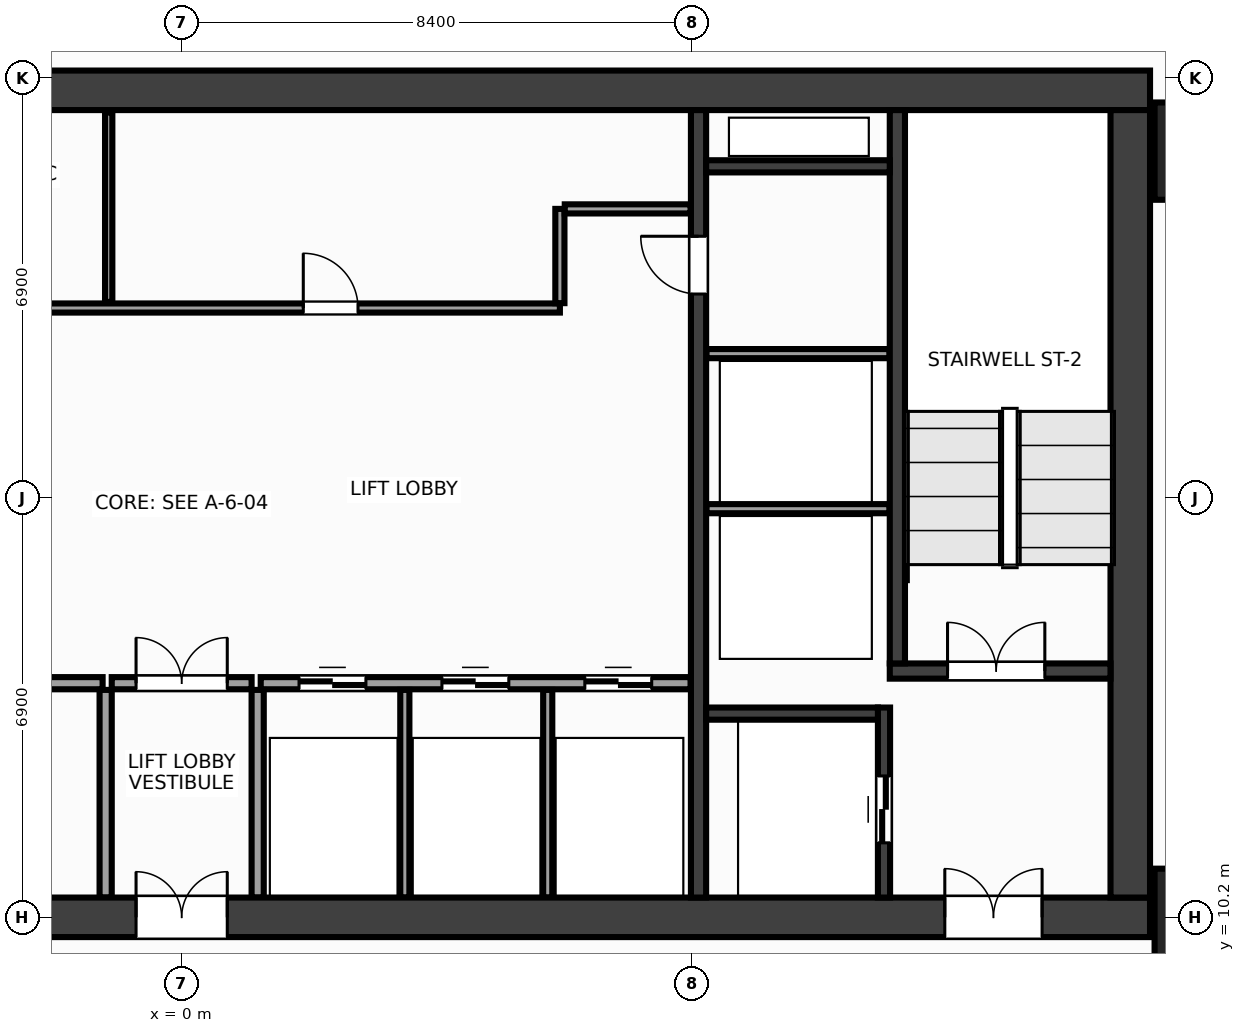
"""IFC4 building model, lengths in metres.
Left out: names, types, materials, properties, quantities, classifications, styles, units other than length and angle.
Written with IfcOpenShell. Run it as: python <this file> out.ifc"""

import sys

from ifc_helpers import new_model, si_unit, direction, frame, frame_2d, origin, origin_2d, place, context, subcontext, project, spatial, rectangle, extrude, source, transform, mapped, element, fill, save


model = new_model("IFC4")
c1 = context("Model", 3, precision=1e-05, world=origin(), true_north=direction((0.0, 1.0)))
c2 = subcontext(c1, "Body", "Model", "MODEL_VIEW")
j1 = project(units=[si_unit("LENGTHUNIT", "METRE"), si_unit("PLANEANGLEUNIT", "RADIAN")], contexts=[c1])
p1 = place(None, origin())
s1 = spatial("IfcSite", under=j1, at=p1, CompositionType="ELEMENT")
p2 = place(p1, origin())
s2 = spatial("IfcBuilding", under=s1, at=p2, CompositionType="ELEMENT")
p3 = place(p2, frame((0.0, 0.0, 110.0)))
s3 = spatial("IfcBuildingStorey", under=s2, at=p3, CompositionType="ELEMENT", Elevation=110.0)
m1 = source(origin(), c2, "Body", "SweptSolid", [
    extrude(rectangle(XDim=31.85, YDim=0.65, at=frame_2d((15.925, 0.0))), origin(), (0.0, 0.0, 1.0), 3.6),
])
p4 = place(p3, frame((-15.925, 23.8, 0.0), z_axis=(0.0, 0.0, 1.0), x_axis=(1.0, 0.0, 0.0)))
e1 = element("IfcWall", 1, at=p4, inside=s3, PredefinedType="SHEAR", context=c2, shape_type="MappedRepresentation", body=[
    mapped(m1, transform((0.0, 0.0, 0.0), x_axis=(1.0, 0.0, 0.0), y_axis=(0.0, 1.0, 0.0), z_axis=(0.0, 0.0, 1.0), scale=1.0)),
])
p5 = place(p3, frame((-15.925, 10.2, 0.0), z_axis=(0.0, 0.0, 1.0), x_axis=(1.0, 0.0, 0.0)))
e2 = element("IfcWall", 2, at=p5, inside=s3, PredefinedType="SHEAR", context=c2, shape_type="MappedRepresentation", body=[
    mapped(m1, transform((0.0, 0.0, 0.0), x_axis=(1.0, 0.0, 0.0), y_axis=(0.0, 1.0, 0.0), z_axis=(0.0, 0.0, 1.0), scale=1.0)),
])
p6 = place(p5, frame((1.775, 0.0, 0.0)))
e3 = element("IfcOpeningElement", 3, at=p6, cuts=e2, PredefinedType="OPENING", context=c2, shape_type="SweptSolid", body=[
    extrude(rectangle(XDim=1.6, YDim=2.15, at=frame_2d((0.8, 1.075))), frame((0.0, 0.337, 0.0), z_axis=(0.0, -1.0, 0.0), x_axis=(1.0, 0.0, 0.0)), (0.0, 0.0, 1.0), 0.674),
])
p7 = place(p5, frame((28.475, 0.0, 0.0)))
e4 = element("IfcOpeningElement", 4, at=p7, cuts=e2, PredefinedType="OPENING", context=c2, shape_type="SweptSolid", body=[
    extrude(rectangle(XDim=1.6, YDim=2.15, at=frame_2d((0.8, 1.075))), frame((0.0, 0.337, 0.0), z_axis=(0.0, -1.0, 0.0), x_axis=(1.0, 0.0, 0.0)), (0.0, 0.0, 1.0), 0.674),
])
p8 = place(p5, frame((15.175, 0.0, 0.0)))
e5 = element("IfcOpeningElement", 5, at=p8, cuts=e2, PredefinedType="OPENING", context=c2, shape_type="SweptSolid", body=[
    extrude(rectangle(XDim=1.5, YDim=2.2, at=frame_2d((0.75, 1.1))), frame((0.0, 0.337, 0.0), z_axis=(0.0, -1.0, 0.0), x_axis=(1.0, 0.0, 0.0)), (0.0, 0.0, 1.0), 0.674),
])
m2 = source(origin(), c2, "Body", "SweptSolid", [
    extrude(rectangle(XDim=12.95, YDim=0.65, at=frame_2d((6.475, 0.0))), origin(), (0.0, 0.0, 1.0), 3.6),
])
p9 = place(p3, frame((15.6, 10.525, 0.0), z_axis=(0.0, 0.0, 1.0), x_axis=(0.0, 1.0, 0.0)))
e6 = element("IfcWall", 6, at=p9, inside=s3, PredefinedType="SHEAR", context=c2, shape_type="MappedRepresentation", body=[
    mapped(m2, transform((0.0, 0.0, 0.0), x_axis=(1.0, 0.0, 0.0), y_axis=(0.0, 1.0, 0.0), z_axis=(0.0, 0.0, 1.0), scale=1.0)),
])
m3 = source(origin(), c2, "Body", "SweptSolid", [
    extrude(rectangle(XDim=12.95, YDim=0.25, at=frame_2d((6.475, 0.0))), origin(), (0.0, 0.0, 1.0), 3.6),
])
p10 = place(p3, frame((8.5, 10.525, 0.0), z_axis=(0.0, 0.0, 1.0), x_axis=(0.0, 1.0, 0.0)))
e7 = element("IfcWall", 7, at=p10, inside=s3, PredefinedType="SHEAR", context=c2, shape_type="MappedRepresentation", body=[
    mapped(m3, transform((0.0, 0.0, 0.0), x_axis=(1.0, 0.0, 0.0), y_axis=(0.0, 1.0, 0.0), z_axis=(0.0, 0.0, 1.0), scale=1.0)),
])
p11 = place(p10, frame((9.925, 0.0, 0.0)))
e8 = element("IfcOpeningElement", 8, at=p11, cuts=e7, PredefinedType="OPENING", context=c2, shape_type="SweptSolid", body=[
    extrude(rectangle(XDim=0.95, YDim=2.15, at=frame_2d((0.475, 1.075))), frame((0.0, 0.137, 0.0), z_axis=(0.0, -1.0, 0.0), x_axis=(1.0, 0.0, 0.0)), (0.0, 0.0, 1.0), 0.274),
])
m4 = source(origin(), c2, "Body", "SweptSolid", [
    extrude(rectangle(XDim=3.63, YDim=0.25, at=frame_2d((1.815, 0.0))), origin(), (0.0, 0.0, 1.0), 3.6),
])
p12 = place(p3, frame((11.645, 14.25, 0.0), z_axis=(0.0, 0.0, 1.0), x_axis=(1.0, 0.0, 0.0)))
e9 = element("IfcWall", 9, at=p12, inside=s3, PredefinedType="SHEAR", context=c2, shape_type="MappedRepresentation", body=[
    mapped(m4, transform((0.0, 0.0, 0.0), x_axis=(1.0, 0.0, 0.0), y_axis=(0.0, 1.0, 0.0), z_axis=(0.0, 0.0, 1.0), scale=1.0)),
])
p13 = place(p12, frame((0.95, 0.0, 0.0)))
e10 = element("IfcOpeningElement", 10, at=p13, cuts=e9, PredefinedType="OPENING", context=c2, shape_type="SweptSolid", body=[
    extrude(rectangle(XDim=1.6, YDim=2.15, at=frame_2d((0.8, 1.075))), frame((0.0, 0.137, 0.0), z_axis=(0.0, -1.0, 0.0), x_axis=(1.0, 0.0, 0.0)), (0.0, 0.0, 1.0), 0.274),
])
m5 = source(origin(), c2, "Body", "SweptSolid", [
    extrude(rectangle(XDim=9.1, YDim=0.25, at=frame_2d((4.55, 0.0))), origin(), (0.0, 0.0, 1.0), 3.6),
])
p14 = place(p3, frame((11.77, 14.375, 0.0), z_axis=(0.0, 0.0, 1.0), x_axis=(0.0, 1.0, 0.0)))
e11 = element("IfcWall", 11, at=p14, inside=s3, PredefinedType="SHEAR", context=c2, shape_type="MappedRepresentation", body=[
    mapped(m5, transform((0.0, 0.0, 0.0), x_axis=(1.0, 0.0, 0.0), y_axis=(0.0, 1.0, 0.0), z_axis=(0.0, 0.0, 1.0), scale=1.0)),
])
m6 = source(origin(), c2, "Body", "SweptSolid", [
    extrude(rectangle(XDim=3.125, YDim=0.2, at=frame_2d((1.562, 0.0))), origin(), (0.0, 0.0, 1.0), 3.6),
])
p15 = place(p3, frame((11.55, 10.525, 0.0), z_axis=(0.0, 0.0, 1.0), x_axis=(0.0, 1.0, 0.0)))
e12 = element("IfcWall", 12, at=p15, inside=s3, PredefinedType="SHEAR", context=c2, shape_type="MappedRepresentation", body=[
    mapped(m6, transform((0.0, 0.0, 0.0), x_axis=(1.0, 0.0, 0.0), y_axis=(0.0, 1.0, 0.0), z_axis=(0.0, 0.0, 1.0), scale=1.0)),
])
p16 = place(p15, frame((0.9, 0.0, 0.0)))
e13 = element("IfcOpeningElement", 13, at=p16, cuts=e12, PredefinedType="OPENING", context=c2, shape_type="SweptSolid", body=[
    extrude(rectangle(XDim=1.1, YDim=2.15, at=frame_2d((0.55, 1.075))), frame((0.0, 0.112, 0.0), z_axis=(0.0, -1.0, 0.0), x_axis=(1.0, 0.0, 0.0)), (0.0, 0.0, 1.0), 0.224),
])
m7 = source(origin(), c2, "Body", "SweptSolid", [
    extrude(rectangle(XDim=2.825, YDim=0.2, at=frame_2d((1.413, 0.0))), origin(), (0.0, 0.0, 1.0), 3.6),
])
p17 = place(p3, frame((8.625, 13.55, 0.0), z_axis=(0.0, 0.0, 1.0), x_axis=(1.0, 0.0, 0.0)))
e14 = element("IfcWall", 14, at=p17, inside=s3, PredefinedType="SHEAR", context=c2, shape_type="MappedRepresentation", body=[
    mapped(m7, transform((0.0, 0.0, 0.0), x_axis=(1.0, 0.0, 0.0), y_axis=(0.0, 1.0, 0.0), z_axis=(0.0, 0.0, 1.0), scale=1.0)),
])
m8 = source(origin(), c2, "Body", "SweptSolid", [
    extrude(rectangle(XDim=3.02, YDim=0.2, at=frame_2d((1.51, 0.0))), origin(), (0.0, 0.0, 1.0), 3.6),
])
p18 = place(p3, frame((8.625, 22.55, 0.0), z_axis=(0.0, 0.0, 1.0), x_axis=(1.0, 0.0, 0.0)))
e15 = element("IfcWall", 15, at=p18, inside=s3, PredefinedType="SHEAR", context=c2, shape_type="MappedRepresentation", body=[
    mapped(m8, transform((0.0, 0.0, 0.0), x_axis=(1.0, 0.0, 0.0), y_axis=(0.0, 1.0, 0.0), z_axis=(0.0, 0.0, 1.0), scale=1.0)),
])
m9 = source(origin(), c2, "Body", "SweptSolid", [
    extrude(rectangle(XDim=1.6, YDim=1.6, at=origin_2d()), origin(), (0.0, 0.0, 1.0), 3.6),
])
for number, where, z_axis, x_axis in (
    (16, (16.8, 10.2, 0.0), (0.0, 0.0, 1.0), (1.0, 0.0, 0.0)),
    (17, (16.8, 22.8, 0.0), (0.0, 0.0, 1.0), (1.0, 0.0, 0.0)),
):
    element("IfcColumn", number, at=place(p3, frame(where, z_axis=z_axis, x_axis=x_axis)), inside=s3, PredefinedType="COLUMN", context=c2, shape_type="MappedRepresentation", body=[
        mapped(m9, transform((0.0, 0.0, 0.0), x_axis=(1.0, 0.0, 0.0), y_axis=(0.0, 1.0, 0.0), z_axis=(0.0, 0.0, 1.0), scale=1.0)),
    ])
m10 = source(origin(), c2, "Body", "SweptSolid", [
    extrude(rectangle(XDim=3.01, YDim=0.15, at=frame_2d((1.505, 0.0))), origin(), (0.0, 0.0, 1.0), 3.36),
])
for number, where, z_axis, x_axis in (
    (18, (8.63, 16.92, 0.0), (0.0, 0.0, 1.0), (1.0, 0.0, 0.0)),
    (19, (8.63, 19.47, 0.0), (0.0, 0.0, 1.0), (1.0, 0.0, 0.0)),
):
    element("IfcWall", number, at=place(p3, frame(where, z_axis=z_axis, x_axis=x_axis)), inside=s3, PredefinedType="PARTITIONING", context=c2, shape_type="MappedRepresentation", body=[
        mapped(m10, transform((0.0, 0.0, 0.0), x_axis=(1.0, 0.0, 0.0), y_axis=(0.0, 1.0, 0.0), z_axis=(0.0, 0.0, 1.0), scale=1.0)),
    ])
m11 = source(origin(), c2, "Body", "SweptSolid", [
    extrude(rectangle(XDim=7.07, YDim=0.2, at=frame_2d((3.535, 0.0))), origin(), (0.0, 0.0, 1.0), 3.36),
])
p19 = place(p3, frame((-8.37, 14.05, 0.0), z_axis=(0.0, 0.0, 1.0), x_axis=(1.0, 0.0, 0.0)))
e20 = element("IfcWall", 20, at=p19, inside=s3, PredefinedType="PARTITIONING", context=c2, shape_type="MappedRepresentation", body=[
    mapped(m11, transform((0.0, 0.0, 0.0), x_axis=(1.0, 0.0, 0.0), y_axis=(0.0, 1.0, 0.0), z_axis=(0.0, 0.0, 1.0), scale=1.0)),
])
p20 = place(p19, frame((2.8, 0.0, 0.0)))
e21 = element("IfcOpeningElement", 21, at=p20, cuts=e20, PredefinedType="OPENING", context=c2, shape_type="SweptSolid", body=[
    extrude(rectangle(XDim=0.98, YDim=2.15, at=frame_2d((0.49, 1.075))), frame((0.0, 0.112, 0.0), z_axis=(0.0, -1.0, 0.0), x_axis=(1.0, 0.0, 0.0)), (0.0, 0.0, 1.0), 0.224),
])
p21 = place(p3, frame((1.3, 14.05, 0.0), z_axis=(0.0, 0.0, 1.0), x_axis=(1.0, 0.0, 0.0)))
e22 = element("IfcWall", 22, at=p21, inside=s3, PredefinedType="PARTITIONING", context=c2, shape_type="MappedRepresentation", body=[
    mapped(m11, transform((0.0, 0.0, 0.0), x_axis=(1.0, 0.0, 0.0), y_axis=(0.0, 1.0, 0.0), z_axis=(0.0, 0.0, 1.0), scale=1.0)),
])
p22 = place(p21, frame((0.63, 0.0, 0.0)))
e23 = element("IfcOpeningElement", 23, at=p22, cuts=e22, PredefinedType="OPENING", context=c2, shape_type="SweptSolid", body=[
    extrude(rectangle(XDim=1.1, YDim=2.15, at=frame_2d((0.55, 1.075))), frame((0.0, 0.112, 0.0), z_axis=(0.0, -1.0, 0.0), x_axis=(1.0, 0.0, 0.0)), (0.0, 0.0, 1.0), 0.224),
])
p23 = place(p21, frame((2.98, 0.0, 0.0)))
e24 = element("IfcOpeningElement", 24, at=p23, cuts=e22, PredefinedType="OPENING", context=c2, shape_type="SweptSolid", body=[
    extrude(rectangle(XDim=1.1, YDim=2.15, at=frame_2d((0.55, 1.075))), frame((0.0, 0.112, 0.0), z_axis=(0.0, -1.0, 0.0), x_axis=(1.0, 0.0, 0.0)), (0.0, 0.0, 1.0), 0.224),
])
p24 = place(p21, frame((5.33, 0.0, 0.0)))
e25 = element("IfcOpeningElement", 25, at=p24, cuts=e22, PredefinedType="OPENING", context=c2, shape_type="SweptSolid", body=[
    extrude(rectangle(XDim=1.1, YDim=2.15, at=frame_2d((0.55, 1.075))), frame((0.0, 0.112, 0.0), z_axis=(0.0, -1.0, 0.0), x_axis=(1.0, 0.0, 0.0)), (0.0, 0.0, 1.0), 0.224),
])
m12 = source(origin(), c2, "Body", "SweptSolid", [
    extrude(rectangle(XDim=3.415, YDim=0.2, at=frame_2d((1.708, 0.0))), origin(), (0.0, 0.0, 1.0), 3.36),
])
for number, where, z_axis, x_axis in (
    (26, (-1.25, 10.525, 0.0), (0.0, 0.0, 1.0), (0.0, 1.0, 0.0)),
    (27, (1.25, 10.525, 0.0), (0.0, 0.0, 1.0), (0.0, 1.0, 0.0)),
):
    element("IfcWall", number, at=place(p3, frame(where, z_axis=z_axis, x_axis=x_axis)), inside=s3, PredefinedType="PARTITIONING", context=c2, shape_type="MappedRepresentation", body=[
        mapped(m12, transform((0.0, 0.0, 0.0), x_axis=(1.0, 0.0, 0.0), y_axis=(0.0, 1.0, 0.0), z_axis=(0.0, 0.0, 1.0), scale=1.0)),
    ])
m13 = source(origin(), c2, "Body", "SweptSolid", [
    extrude(rectangle(XDim=2.3, YDim=0.2, at=frame_2d((1.15, 0.0))), origin(), (0.0, 0.0, 1.0), 3.36),
])
p25 = place(p3, frame((-1.15, 14.05, 0.0), z_axis=(0.0, 0.0, 1.0), x_axis=(1.0, 0.0, 0.0)))
e28 = element("IfcWall", 28, at=p25, inside=s3, PredefinedType="PARTITIONING", context=c2, shape_type="MappedRepresentation", body=[
    mapped(m13, transform((0.0, 0.0, 0.0), x_axis=(1.0, 0.0, 0.0), y_axis=(0.0, 1.0, 0.0), z_axis=(0.0, 0.0, 1.0), scale=1.0)),
])
p26 = place(p25, frame((0.4, 0.0, 0.0)))
e29 = element("IfcOpeningElement", 29, at=p26, cuts=e28, PredefinedType="OPENING", context=c2, shape_type="SweptSolid", body=[
    extrude(rectangle(XDim=1.5, YDim=2.2, at=frame_2d((0.75, 1.1))), frame((0.0, 0.112, 0.0), z_axis=(0.0, -1.0, 0.0), x_axis=(1.0, 0.0, 0.0)), (0.0, 0.0, 1.0), 0.224),
])
m14 = source(origin(), c2, "Body", "SweptSolid", [
    extrude(rectangle(XDim=14.59, YDim=0.15, at=frame_2d((7.295, 0.0))), origin(), (0.0, 0.0, 1.0), 3.36),
])
p27 = place(p3, frame((-8.37, 20.22, 0.0), z_axis=(0.0, 0.0, 1.0), x_axis=(1.0, 0.0, 0.0)))
e30 = element("IfcWall", 30, at=p27, inside=s3, PredefinedType="PARTITIONING", context=c2, shape_type="MappedRepresentation", body=[
    mapped(m14, transform((0.0, 0.0, 0.0), x_axis=(1.0, 0.0, 0.0), y_axis=(0.0, 1.0, 0.0), z_axis=(0.0, 0.0, 1.0), scale=1.0)),
])
p28 = place(p27, frame((1.36, 0.0, 0.0)))
e31 = element("IfcOpeningElement", 31, at=p28, cuts=e30, PredefinedType="OPENING", context=c2, shape_type="SweptSolid", body=[
    extrude(rectangle(XDim=0.9, YDim=2.15, at=frame_2d((0.45, 1.075))), frame((0.0, 0.087, 0.0), z_axis=(0.0, -1.0, 0.0), x_axis=(1.0, 0.0, 0.0)), (0.0, 0.0, 1.0), 0.174),
])
p29 = place(p27, frame((4.92, 0.0, 0.0)))
e32 = element("IfcOpeningElement", 32, at=p29, cuts=e30, PredefinedType="OPENING", context=c2, shape_type="SweptSolid", body=[
    extrude(rectangle(XDim=0.9, YDim=2.15, at=frame_2d((0.45, 1.075))), frame((0.0, 0.087, 0.0), z_axis=(0.0, -1.0, 0.0), x_axis=(1.0, 0.0, 0.0)), (0.0, 0.0, 1.0), 0.174),
])
p30 = place(p27, frame((10.37, 0.0, 0.0)))
e33 = element("IfcOpeningElement", 33, at=p30, cuts=e30, PredefinedType="OPENING", context=c2, shape_type="SweptSolid", body=[
    extrude(rectangle(XDim=0.9, YDim=2.15, at=frame_2d((0.45, 1.075))), frame((0.0, 0.087, 0.0), z_axis=(0.0, -1.0, 0.0), x_axis=(1.0, 0.0, 0.0)), (0.0, 0.0, 1.0), 0.174),
])
m15 = source(origin(), c2, "Body", "SweptSolid", [
    extrude(rectangle(XDim=1.55, YDim=0.15, at=frame_2d((0.775, 0.0))), origin(), (0.0, 0.0, 1.0), 3.36),
])
p31 = place(p3, frame((6.22, 20.3, 0.0), z_axis=(0.0, 0.0, 1.0), x_axis=(0.0, 1.0, 0.0)))
e34 = element("IfcWall", 34, at=p31, inside=s3, PredefinedType="PARTITIONING", context=c2, shape_type="MappedRepresentation", body=[
    mapped(m15, transform((0.0, 0.0, 0.0), x_axis=(1.0, 0.0, 0.0), y_axis=(0.0, 1.0, 0.0), z_axis=(0.0, 0.0, 1.0), scale=1.0)),
])
m16 = source(origin(), c2, "Body", "SweptSolid", [
    extrude(rectangle(XDim=2.07, YDim=0.15, at=frame_2d((1.035, 0.0))), origin(), (0.0, 0.0, 1.0), 3.36),
])
p32 = place(p3, frame((6.3, 21.85, 0.0), z_axis=(0.0, 0.0, 1.0), x_axis=(1.0, 0.0, 0.0)))
e35 = element("IfcWall", 35, at=p32, inside=s3, PredefinedType="PARTITIONING", context=c2, shape_type="MappedRepresentation", body=[
    mapped(m16, transform((0.0, 0.0, 0.0), x_axis=(1.0, 0.0, 0.0), y_axis=(0.0, 1.0, 0.0), z_axis=(0.0, 0.0, 1.0), scale=1.0)),
])
m17 = source(origin(), c2, "Body", "SweptSolid", [
    extrude(rectangle(XDim=3.415, YDim=0.15, at=frame_2d((1.708, 0.0))), origin(), (0.0, 0.0, 1.0), 3.36),
])
for number, where, z_axis, x_axis in (
    (36, (3.67, 10.525, 0.0), (0.0, 0.0, 1.0), (0.0, 1.0, 0.0)),
    (37, (6.02, 10.525, 0.0), (0.0, 0.0, 1.0), (0.0, 1.0, 0.0)),
):
    element("IfcWall", number, at=place(p3, frame(where, z_axis=z_axis, x_axis=x_axis)), inside=s3, PredefinedType="PARTITIONING", context=c2, shape_type="MappedRepresentation", body=[
        mapped(m17, transform((0.0, 0.0, 0.0), x_axis=(1.0, 0.0, 0.0), y_axis=(0.0, 1.0, 0.0), z_axis=(0.0, 0.0, 1.0), scale=1.0)),
    ])
m18 = source(origin(), c2, "Body", "SweptSolid", [
    extrude(rectangle(XDim=3.115, YDim=0.12, at=frame_2d((1.558, 0.0))), origin(), (0.0, 0.0, 1.0), 3.36),
])
p33 = place(p3, frame((-1.2, 20.32, 0.0), z_axis=(0.0, 0.0, 1.0), x_axis=(0.0, 1.0, 0.0)))
e38 = element("IfcWall", 38, at=p33, inside=s3, PredefinedType="PARTITIONING", context=c2, shape_type="MappedRepresentation", body=[
    mapped(m18, transform((0.0, 0.0, 0.0), x_axis=(1.0, 0.0, 0.0), y_axis=(0.0, 1.0, 0.0), z_axis=(0.0, 0.0, 1.0), scale=1.0)),
])
m19 = source(origin(), c2, "Body", "SweptSolid", [
    extrude(rectangle(XDim=1.6, YDim=2.15, at=frame_2d((0.8, 1.075))), frame((0.0, 0.025, 0.0), z_axis=(0.0, -1.0, 0.0), x_axis=(1.0, 0.0, 0.0)), (0.0, 0.0, 1.0), 0.05),
])
p34 = place(p13, origin())
e39 = element("IfcDoor", 39, at=p34, inside=s3, OperationType="DOUBLE_DOOR_SINGLE_SWING", PredefinedType="DOOR", context=c2, shape_type="MappedRepresentation", body=[
    mapped(m19, transform((0.0, 0.0, 0.0), x_axis=(1.0, 0.0, 0.0), y_axis=(0.0, 1.0, 0.0), z_axis=(0.0, 0.0, 1.0), scale=1.0)),
])
fill(e10, e39)
p35 = place(p7, origin())
e40 = element("IfcDoor", 40, at=p35, inside=s3, OperationType="DOUBLE_DOOR_SINGLE_SWING", PredefinedType="DOOR", context=c2, shape_type="MappedRepresentation", body=[
    mapped(m19, transform((0.0, 0.0, 0.0), x_axis=(1.0, 0.0, 0.0), y_axis=(0.0, 1.0, 0.0), z_axis=(0.0, 0.0, 1.0), scale=1.0)),
])
fill(e4, e40)
m20 = source(origin(), c2, "Body", "SweptSolid", [
    extrude(rectangle(XDim=1.1, YDim=2.15, at=frame_2d((0.55, 1.075))), frame((0.0, 0.025, 0.0), z_axis=(0.0, -1.0, 0.0), x_axis=(1.0, 0.0, 0.0)), (0.0, 0.0, 1.0), 0.05),
])
p36 = place(p16, origin())
e41 = element("IfcDoor", 41, at=p36, inside=s3, OperationType="DOUBLE_DOOR_SLIDING", PredefinedType="DOOR", context=c2, shape_type="MappedRepresentation", body=[
    mapped(m20, transform((0.0, 0.0, 0.0), x_axis=(1.0, 0.0, 0.0), y_axis=(0.0, 1.0, 0.0), z_axis=(0.0, 0.0, 1.0), scale=1.0)),
])
fill(e13, e41)
m21 = source(origin(), c2, "Body", "SweptSolid", [
    extrude(rectangle(XDim=0.95, YDim=2.15, at=frame_2d((0.475, 1.075))), frame((0.0, 0.025, 0.0), z_axis=(0.0, -1.0, 0.0), x_axis=(1.0, 0.0, 0.0)), (0.0, 0.0, 1.0), 0.05),
])
p37 = place(p11, origin())
e42 = element("IfcDoor", 42, at=p37, inside=s3, OperationType="SINGLE_SWING_RIGHT", PredefinedType="DOOR", context=c2, shape_type="MappedRepresentation", body=[
    mapped(m21, transform((0.0, 0.0, 0.0), x_axis=(1.0, 0.0, 0.0), y_axis=(0.0, 1.0, 0.0), z_axis=(0.0, 0.0, 1.0), scale=1.0)),
])
fill(e8, e42)
p38 = place(p22, origin())
e43 = element("IfcDoor", 43, at=p38, inside=s3, OperationType="DOUBLE_DOOR_SLIDING", PredefinedType="DOOR", context=c2, shape_type="MappedRepresentation", body=[
    mapped(m20, transform((0.0, 0.0, 0.0), x_axis=(1.0, 0.0, 0.0), y_axis=(0.0, 1.0, 0.0), z_axis=(0.0, 0.0, 1.0), scale=1.0)),
])
fill(e23, e43)
p39 = place(p23, origin())
e44 = element("IfcDoor", 44, at=p39, inside=s3, OperationType="DOUBLE_DOOR_SLIDING", PredefinedType="DOOR", context=c2, shape_type="MappedRepresentation", body=[
    mapped(m20, transform((0.0, 0.0, 0.0), x_axis=(1.0, 0.0, 0.0), y_axis=(0.0, 1.0, 0.0), z_axis=(0.0, 0.0, 1.0), scale=1.0)),
])
fill(e24, e44)
p40 = place(p24, origin())
e45 = element("IfcDoor", 45, at=p40, inside=s3, OperationType="DOUBLE_DOOR_SLIDING", PredefinedType="DOOR", context=c2, shape_type="MappedRepresentation", body=[
    mapped(m20, transform((0.0, 0.0, 0.0), x_axis=(1.0, 0.0, 0.0), y_axis=(0.0, 1.0, 0.0), z_axis=(0.0, 0.0, 1.0), scale=1.0)),
])
fill(e25, e45)
m22 = source(origin(), c2, "Body", "SweptSolid", [
    extrude(rectangle(XDim=1.5, YDim=2.2, at=frame_2d((0.75, 1.1))), frame((0.0, 0.025, 0.0), z_axis=(0.0, -1.0, 0.0), x_axis=(1.0, 0.0, 0.0)), (0.0, 0.0, 1.0), 0.05),
])
p41 = place(p26, origin())
e46 = element("IfcDoor", 46, at=p41, inside=s3, OperationType="DOUBLE_DOOR_SINGLE_SWING", PredefinedType="DOOR", context=c2, shape_type="MappedRepresentation", body=[
    mapped(m22, transform((0.0, 0.0, 0.0), x_axis=(1.0, 0.0, 0.0), y_axis=(0.0, 1.0, 0.0), z_axis=(0.0, 0.0, 1.0), scale=1.0)),
])
fill(e29, e46)
p42 = place(p8, origin())
e47 = element("IfcDoor", 47, at=p42, inside=s3, OperationType="DOUBLE_DOOR_SINGLE_SWING", PredefinedType="DOOR", context=c2, shape_type="MappedRepresentation", body=[
    mapped(m22, transform((0.0, 0.0, 0.0), x_axis=(1.0, 0.0, 0.0), y_axis=(0.0, 1.0, 0.0), z_axis=(0.0, 0.0, 1.0), scale=1.0)),
])
fill(e5, e47)
m23 = source(origin(), c2, "Body", "SweptSolid", [
    extrude(rectangle(XDim=0.9, YDim=2.15, at=frame_2d((0.45, 1.075))), frame((0.0, 0.025, 0.0), z_axis=(0.0, -1.0, 0.0), x_axis=(1.0, 0.0, 0.0)), (0.0, 0.0, 1.0), 0.05),
])
p43 = place(p30, origin())
e48 = element("IfcDoor", 48, at=p43, inside=s3, OperationType="SINGLE_SWING_LEFT", PredefinedType="DOOR", context=c2, shape_type="MappedRepresentation", body=[
    mapped(m23, transform((0.0, 0.0, 0.0), x_axis=(1.0, 0.0, 0.0), y_axis=(0.0, 1.0, 0.0), z_axis=(0.0, 0.0, 1.0), scale=1.0)),
])
fill(e33, e48)
save(model, sys.argv[1])
